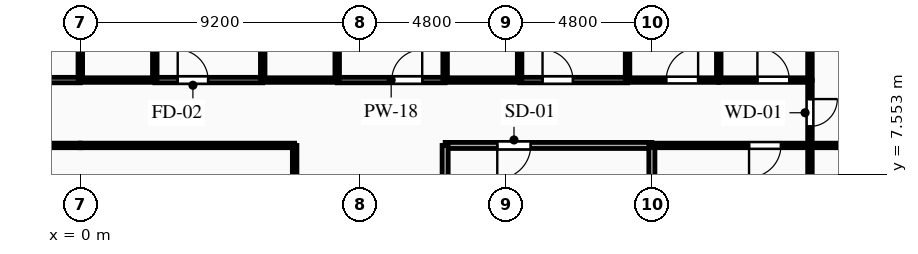
"""IFC4 building model, lengths in metres.
Left out: names, types, materials, properties, quantities, classifications, styles, units other than length and angle.
Written with IfcOpenShell. Run it as: python <this file> out.ifc"""

import sys

from ifc_helpers import new_model, si_unit, direction, frame, frame_2d, origin, place, context, subcontext, project, spatial, rectangle, extrude, element, fill, save


model = new_model("IFC4")
c1 = context("Model", 3, precision=1e-05, world=origin(), true_north=direction((0.0, 1.0)))
c2 = subcontext(c1, "Body", "Model", "MODEL_VIEW")
j1 = project(units=[si_unit("LENGTHUNIT", "METRE"), si_unit("PLANEANGLEUNIT", "RADIAN")], contexts=[c1])
p1 = place(None, origin())
s1 = spatial("IfcSite", under=j1, at=p1, CompositionType="ELEMENT")
p2 = place(p1, origin())
s2 = spatial("IfcBuilding", under=s1, at=p2, CompositionType="ELEMENT")
p3 = place(p2, frame((0.0, 0.0, 22.5)))
s3 = spatial("IfcBuildingStorey", under=s2, at=p3, CompositionType="ELEMENT", Elevation=22.5)
p4 = place(p3, frame((18.8, 8.5, 0.0), z_axis=(0.0, 0.0, 1.0), x_axis=(-1.0, 0.0, 0.0)))
e1 = element("IfcWall", 1, at=p4, inside=s3, PredefinedType="PARTITIONING", context=c2, shape_type="SweptSolid", body=[
    extrude(rectangle(XDim=6.8, YDim=0.2, at=frame_2d((3.4, 0.0))), origin(), (0.0, 0.0, 1.0), 4.16),
])
p5 = place(p4, frame((3.985, 0.0, 0.0)))
e2 = element("IfcOpeningElement", 2, at=p5, cuts=e1, PredefinedType="OPENING", context=c2, shape_type="SweptSolid", body=[
    extrude(rectangle(XDim=1.1, YDim=2.15, at=frame_2d((0.55, 1.075))), frame((0.0, 0.11, 0.0), z_axis=(0.0, -1.0, 0.0), x_axis=(1.0, 0.0, 0.0)), (0.0, 0.0, 1.0), 0.22),
])
p6 = place(p3, frame((12.0, 8.5, 0.0), z_axis=(0.0, 0.0, 1.0), x_axis=(0.0, -1.0, 0.0)))
e3 = element("IfcWall", 3, at=p6, inside=s3, PredefinedType="PARTITIONING", context=c2, shape_type="SweptSolid", body=[
    extrude(rectangle(XDim=2.9, YDim=0.2, at=frame_2d((1.45, 0.0))), origin(), (0.0, 0.0, 1.0), 4.16),
])
p7 = place(p3, frame((18.8, 5.6, 0.0), z_axis=(0.0, 0.0, 1.0), x_axis=(0.0, 1.0, 0.0)))
e4 = element("IfcWall", 4, at=p7, inside=s3, PredefinedType="PARTITIONING", context=c2, shape_type="SweptSolid", body=[
    extrude(rectangle(XDim=2.9, YDim=0.2, at=frame_2d((1.45, 0.0))), origin(), (0.0, 0.0, 1.0), 3.645),
])
p8 = place(p3, frame((-3.55, 10.65, 0.0), z_axis=(0.0, 0.0, 1.0), x_axis=(1.0, 0.0, 0.0)))
e5 = element("IfcWall", 5, at=p8, inside=s3, PredefinedType="PARTITIONING", context=c2, shape_type="SweptSolid", body=[
    extrude(rectangle(XDim=3.55, YDim=0.18, at=frame_2d((1.775, 0.0))), origin(), (0.0, 0.0, 1.0), 4.16),
])
p9 = place(p8, frame((1.275, 0.0, 0.0)))
e6 = element("IfcOpeningElement", 6, at=p9, cuts=e5, PredefinedType="OPENING", context=c2, shape_type="SweptSolid", body=[
    extrude(rectangle(XDim=1.0, YDim=2.15, at=frame_2d((0.5, 1.075))), frame((0.0, 0.1, 0.0), z_axis=(0.0, -1.0, 0.0), x_axis=(1.0, 0.0, 0.0)), (0.0, 0.0, 1.0), 0.2),
])
p10 = place(p3, frame((0.0, 8.5, 0.0), z_axis=(0.0, 0.0, 1.0), x_axis=(-1.0, 0.0, 0.0)))
e7 = element("IfcWall", 7, at=p10, inside=s3, PredefinedType="PARTITIONING", context=c2, shape_type="SweptSolid", body=[
    extrude(rectangle(XDim=7.05, YDim=0.15, at=frame_2d((3.525, 0.0))), origin(), (0.0, 0.0, 1.0), 4.16),
])
p11 = place(p3, frame((24.0, 10.65, 0.0), z_axis=(0.0, 0.0, 1.0), x_axis=(0.0, -1.0, 0.0)))
e8 = element("IfcWall", 8, at=p11, inside=s3, PredefinedType="PARTITIONING", context=c2, shape_type="SweptSolid", body=[
    extrude(rectangle(XDim=2.15, YDim=0.15, at=frame_2d((1.075, 0.0))), origin(), (0.0, 0.0, 1.0), 4.16),
])
p12 = place(p11, frame((0.625, 0.0, 0.0)))
e9 = element("IfcOpeningElement", 9, at=p12, cuts=e8, PredefinedType="OPENING", context=c2, shape_type="SweptSolid", body=[
    extrude(rectangle(XDim=0.9, YDim=2.1, at=frame_2d((0.45, 1.05))), frame((0.0, 0.085, 0.0), z_axis=(0.0, -1.0, 0.0), x_axis=(1.0, 0.0, 0.0)), (0.0, 0.0, 1.0), 0.17),
])
p13 = place(p3, frame((24.0, 8.5, 0.0), z_axis=(0.0, 0.0, 1.0), x_axis=(-1.0, 0.0, 0.0)))
e10 = element("IfcWall", 10, at=p13, inside=s3, PredefinedType="PARTITIONING", context=c2, shape_type="SweptSolid", body=[
    extrude(rectangle(XDim=5.2, YDim=0.15, at=frame_2d((2.6, 0.0))), origin(), (0.0, 0.0, 1.0), 4.16),
])
p14 = place(p13, frame((0.954, 0.0, 0.0)))
e11 = element("IfcOpeningElement", 11, at=p14, cuts=e10, PredefinedType="OPENING", context=c2, shape_type="SweptSolid", body=[
    extrude(rectangle(XDim=1.05, YDim=2.15, at=frame_2d((0.525, 1.075))), frame((0.0, 0.085, 0.0), z_axis=(0.0, -1.0, 0.0), x_axis=(1.0, 0.0, 0.0)), (0.0, 0.0, 1.0), 0.17),
])
p15 = place(p3, frame((2.45, 10.65, 0.0), z_axis=(0.0, 0.0, 1.0), x_axis=(1.0, 0.0, 0.0)))
e12 = element("IfcWall", 12, at=p15, inside=s3, PredefinedType="PARTITIONING", context=c2, shape_type="SweptSolid", body=[
    extrude(rectangle(XDim=3.55, YDim=0.18, at=frame_2d((1.775, 0.0))), origin(), (0.0, 0.0, 1.0), 4.16),
])
p16 = place(p15, frame((0.754, 0.0, 0.0)))
e13 = element("IfcOpeningElement", 13, at=p16, cuts=e12, PredefinedType="OPENING", context=c2, shape_type="SweptSolid", body=[
    extrude(rectangle(XDim=1.0, YDim=2.15, at=frame_2d((0.5, 1.075))), frame((0.0, 0.1, 0.0), z_axis=(0.0, -1.0, 0.0), x_axis=(1.0, 0.0, 0.0)), (0.0, 0.0, 1.0), 0.2),
])
p17 = place(p3, frame((0.0, 10.65, 0.0), z_axis=(0.0, 0.0, 1.0), x_axis=(1.0, 0.0, 0.0)))
e14 = element("IfcWall", 14, at=p17, inside=s3, PredefinedType="PLUMBINGWALL", context=c2, shape_type="SweptSolid", body=[
    extrude(rectangle(XDim=2.45, YDim=0.15, at=frame_2d((1.225, 0.0))), origin(), (0.0, 0.0, 1.0), 4.16),
])
p18 = place(p3, frame((8.45, 10.65, 0.0), z_axis=(0.0, 0.0, 1.0), x_axis=(1.0, 0.0, 0.0)))
e15 = element("IfcWall", 15, at=p18, inside=s3, PredefinedType="PARTITIONING", context=c2, shape_type="SweptSolid", body=[
    extrude(rectangle(XDim=3.55, YDim=0.18, at=frame_2d((1.775, 0.0))), origin(), (0.0, 0.0, 1.0), 4.16),
])
p19 = place(p18, frame((1.796, 0.0, 0.0)))
e16 = element("IfcOpeningElement", 16, at=p19, cuts=e15, PredefinedType="OPENING", context=c2, shape_type="SweptSolid", body=[
    extrude(rectangle(XDim=1.0, YDim=2.15, at=frame_2d((0.5, 1.075))), frame((0.0, 0.1, 0.0), z_axis=(0.0, -1.0, 0.0), x_axis=(1.0, 0.0, 0.0)), (0.0, 0.0, 1.0), 0.2),
])
p20 = place(p3, frame((6.0, 10.65, 0.0), z_axis=(0.0, 0.0, 1.0), x_axis=(1.0, 0.0, 0.0)))
e17 = element("IfcWall", 17, at=p20, inside=s3, PredefinedType="PLUMBINGWALL", context=c2, shape_type="SweptSolid", body=[
    extrude(rectangle(XDim=2.45, YDim=0.15, at=frame_2d((1.225, 0.0))), origin(), (0.0, 0.0, 1.0), 4.16),
])
p21 = place(p3, frame((14.45, 10.65, 0.0), z_axis=(0.0, 0.0, 1.0), x_axis=(1.0, 0.0, 0.0)))
e18 = element("IfcWall", 18, at=p21, inside=s3, PredefinedType="PARTITIONING", context=c2, shape_type="SweptSolid", body=[
    extrude(rectangle(XDim=3.55, YDim=0.18, at=frame_2d((1.775, 0.0))), origin(), (0.0, 0.0, 1.0), 4.16),
])
p22 = place(p21, frame((0.754, 0.0, 0.0)))
e19 = element("IfcOpeningElement", 19, at=p22, cuts=e18, PredefinedType="OPENING", context=c2, shape_type="SweptSolid", body=[
    extrude(rectangle(XDim=1.0, YDim=2.15, at=frame_2d((0.5, 1.075))), frame((0.0, 0.1, 0.0), z_axis=(0.0, -1.0, 0.0), x_axis=(1.0, 0.0, 0.0)), (0.0, 0.0, 1.0), 0.2),
])
p23 = place(p3, frame((12.0, 10.65, 0.0), z_axis=(0.0, 0.0, 1.0), x_axis=(1.0, 0.0, 0.0)))
e20 = element("IfcWall", 20, at=p23, inside=s3, PredefinedType="PLUMBINGWALL", context=c2, shape_type="SweptSolid", body=[
    extrude(rectangle(XDim=2.45, YDim=0.15, at=frame_2d((1.225, 0.0))), origin(), (0.0, 0.0, 1.0), 4.16),
])
p24 = place(p3, frame((18.0, 10.65, 0.0), z_axis=(0.0, 0.0, 1.0), x_axis=(1.0, 0.0, 0.0)))
e21 = element("IfcWall", 21, at=p24, inside=s3, PredefinedType="PARTITIONING", context=c2, shape_type="SweptSolid", body=[
    extrude(rectangle(XDim=3.0, YDim=0.15, at=frame_2d((1.5, 0.0))), origin(), (0.0, 0.0, 1.0), 4.16),
])
p25 = place(p24, frame((1.271, 0.0, 0.0)))
e22 = element("IfcOpeningElement", 22, at=p25, cuts=e21, PredefinedType="OPENING", context=c2, shape_type="SweptSolid", body=[
    extrude(rectangle(XDim=1.05, YDim=2.15, at=frame_2d((0.525, 1.075))), frame((0.0, 0.085, 0.0), z_axis=(0.0, -1.0, 0.0), x_axis=(1.0, 0.0, 0.0)), (0.0, 0.0, 1.0), 0.17),
])
p26 = place(p3, frame((21.0, 10.65, 0.0), z_axis=(0.0, 0.0, 1.0), x_axis=(1.0, 0.0, 0.0)))
e23 = element("IfcWall", 23, at=p26, inside=s3, PredefinedType="PARTITIONING", context=c2, shape_type="SweptSolid", body=[
    extrude(rectangle(XDim=3.0, YDim=0.15, at=frame_2d((1.5, 0.0))), origin(), (0.0, 0.0, 1.0), 4.16),
])
p27 = place(p26, frame((1.271, 0.0, 0.0)))
e24 = element("IfcOpeningElement", 24, at=p27, cuts=e23, PredefinedType="OPENING", context=c2, shape_type="SweptSolid", body=[
    extrude(rectangle(XDim=1.05, YDim=2.15, at=frame_2d((0.525, 1.075))), frame((0.0, 0.085, 0.0), z_axis=(0.0, -1.0, 0.0), x_axis=(1.0, 0.0, 0.0)), (0.0, 0.0, 1.0), 0.17),
])
p28 = place(p3, frame((7.05, 8.5, 0.0), z_axis=(0.0, 0.0, 1.0), x_axis=(-1.0, 0.0, 0.0)))
e25 = element("IfcWall", 25, at=p28, inside=s3, PredefinedType="PARTITIONING", context=c2, shape_type="SweptSolid", body=[
    extrude(rectangle(XDim=7.05, YDim=0.15, at=frame_2d((3.525, 0.0))), origin(), (0.0, 0.0, 1.0), 4.16),
])
p29 = place(p3, frame((7.05, -5.6, 0.0), z_axis=(0.0, 0.0, 1.0), x_axis=(0.0, 1.0, 0.0)))
e26 = element("IfcWall", 26, at=p29, inside=s3, PredefinedType="PARTITIONING", context=c2, shape_type="SweptSolid", body=[
    extrude(rectangle(XDim=14.1, YDim=0.15, at=frame_2d((7.05, 0.0))), origin(), (0.0, 0.0, 1.0), 4.16),
])
p30 = place(p3, frame((24.0, 8.5, 0.0), z_axis=(0.0, 0.0, 1.0), x_axis=(1.0, 0.0, 0.0)))
e27 = element("IfcWall", 27, at=p30, inside=s3, PredefinedType="PARTITIONING", context=c2, shape_type="SweptSolid", body=[
    extrude(rectangle(XDim=2.65, YDim=0.15, at=frame_2d((1.325, 0.0))), origin(), (0.0, 0.0, 1.0), 4.16),
])
p31 = place(p30, frame((0.965, 0.0, 0.0)))
e28 = element("IfcOpeningElement", 28, at=p31, cuts=e27, PredefinedType="OPENING", context=c2, shape_type="SweptSolid", body=[
    extrude(rectangle(XDim=1.05, YDim=2.15, at=frame_2d((0.525, 1.075))), frame((0.0, 0.085, 0.0), z_axis=(0.0, -1.0, 0.0), x_axis=(1.0, 0.0, 0.0)), (0.0, 0.0, 1.0), 0.17),
])
p32 = place(p3, frame((24.0, -5.6, 0.0), z_axis=(0.0, 0.0, 1.0), x_axis=(0.0, 1.0, 0.0)))
e29 = element("IfcWall", 29, at=p32, inside=s3, PredefinedType="PARTITIONING", context=c2, shape_type="SweptSolid", body=[
    extrude(rectangle(XDim=14.1, YDim=0.15, at=frame_2d((7.05, 0.0))), origin(), (0.0, 0.0, 1.0), 4.16),
])
p33 = place(p3, frame((24.0, 10.65, 0.0), z_axis=(0.0, 0.0, 1.0), x_axis=(0.0, 1.0, 0.0)))
e30 = element("IfcWall", 30, at=p33, inside=s3, PredefinedType="PARTITIONING", context=c2, shape_type="SweptSolid", body=[
    extrude(rectangle(XDim=14.15, YDim=0.15, at=frame_2d((7.075, 0.0))), origin(), (0.0, 0.0, 1.0), 4.16),
])
for number, where, z_axis, x_axis in (
    (31, (0.0, 12.8, 0.0), (0.0, 0.0, 1.0), (0.0, -1.0, 0.0)),
    (32, (2.45, 10.65, 0.0), (0.0, 0.0, 1.0), (0.0, 1.0, 0.0)),
    (33, (6.0, 12.8, 0.0), (0.0, 0.0, 1.0), (0.0, -1.0, 0.0)),
    (34, (8.45, 10.65, 0.0), (0.0, 0.0, 1.0), (0.0, 1.0, 0.0)),
    (35, (12.0, 12.8, 0.0), (0.0, 0.0, 1.0), (0.0, -1.0, 0.0)),
    (36, (14.45, 10.65, 0.0), (0.0, 0.0, 1.0), (0.0, 1.0, 0.0)),
):
    element("IfcWall", number, at=place(p3, frame(where, z_axis=z_axis, x_axis=x_axis)), inside=s3, PredefinedType="PLUMBINGWALL", context=c2, shape_type="SweptSolid", body=[
        extrude(rectangle(XDim=2.15, YDim=0.15, at=frame_2d((1.075, 0.0))), origin(), (0.0, 0.0, 1.0), 4.16),
    ])
for number, where, z_axis, x_axis in (
    (37, (18.0, 24.8, 0.0), (0.0, 0.0, 1.0), (0.0, -1.0, 0.0)),
    (38, (21.0, 24.8, 0.0), (0.0, 0.0, 1.0), (0.0, -1.0, 0.0)),
):
    element("IfcWall", number, at=place(p3, frame(where, z_axis=z_axis, x_axis=x_axis)), inside=s3, PredefinedType="PARTITIONING", context=c2, shape_type="SweptSolid", body=[
        extrude(rectangle(XDim=14.15, YDim=0.15, at=frame_2d((7.075, 0.0))), origin(), (0.0, 0.0, 1.0), 4.16),
    ])
p34 = place(p5, origin())
e39 = element("IfcDoor", 39, at=p34, inside=s3, OperationType="SINGLE_SWING_RIGHT", PredefinedType="DOOR", context=c2, shape_type="SweptSolid", body=[
    extrude(rectangle(XDim=1.1, YDim=2.15, at=frame_2d((0.55, 1.075))), frame((0.0, 0.025, 0.0), z_axis=(0.0, -1.0, 0.0), x_axis=(1.0, 0.0, 0.0)), (0.0, 0.0, 1.0), 0.05),
])
fill(e2, e39)
p35 = place(p12, origin())
e40 = element("IfcDoor", 40, at=p35, inside=s3, OperationType="SINGLE_SWING_LEFT", PredefinedType="DOOR", context=c2, shape_type="SweptSolid", body=[
    extrude(rectangle(XDim=0.9, YDim=2.1, at=frame_2d((0.45, 1.05))), frame((0.0, 0.025, 0.0), z_axis=(0.0, -1.0, 0.0), x_axis=(1.0, 0.0, 0.0)), (0.0, 0.0, 1.0), 0.05),
])
fill(e9, e40)
p36 = place(p14, origin())
e41 = element("IfcDoor", 41, at=p36, inside=s3, OperationType="SINGLE_SWING_RIGHT", PredefinedType="DOOR", context=c2, shape_type="SweptSolid", body=[
    extrude(rectangle(XDim=1.05, YDim=2.15, at=frame_2d((0.525, 1.075))), frame((0.0, 0.025, 0.0), z_axis=(0.0, -1.0, 0.0), x_axis=(1.0, 0.0, 0.0)), (0.0, 0.0, 1.0), 0.05),
])
fill(e11, e41)
p37 = place(p16, origin())
e42 = element("IfcDoor", 42, at=p37, inside=s3, OperationType="SINGLE_SWING_LEFT", PredefinedType="DOOR", context=c2, shape_type="SweptSolid", body=[
    extrude(rectangle(XDim=1.0, YDim=2.15, at=frame_2d((0.5, 1.075))), frame((0.0, 0.025, 0.0), z_axis=(0.0, -1.0, 0.0), x_axis=(1.0, 0.0, 0.0)), (0.0, 0.0, 1.0), 0.05),
])
fill(e13, e42)
p38 = place(p19, origin())
e43 = element("IfcDoor", 43, at=p38, inside=s3, OperationType="SINGLE_SWING_RIGHT", PredefinedType="DOOR", context=c2, shape_type="SweptSolid", body=[
    extrude(rectangle(XDim=1.0, YDim=2.15, at=frame_2d((0.5, 1.075))), frame((0.0, 0.025, 0.0), z_axis=(0.0, -1.0, 0.0), x_axis=(1.0, 0.0, 0.0)), (0.0, 0.0, 1.0), 0.05),
])
fill(e16, e43)
p39 = place(p22, origin())
e44 = element("IfcDoor", 44, at=p39, inside=s3, OperationType="SINGLE_SWING_LEFT", PredefinedType="DOOR", context=c2, shape_type="SweptSolid", body=[
    extrude(rectangle(XDim=1.0, YDim=2.15, at=frame_2d((0.5, 1.075))), frame((0.0, 0.025, 0.0), z_axis=(0.0, -1.0, 0.0), x_axis=(1.0, 0.0, 0.0)), (0.0, 0.0, 1.0), 0.05),
])
fill(e19, e44)
p40 = place(p25, origin())
e45 = element("IfcDoor", 45, at=p40, inside=s3, OperationType="SINGLE_SWING_RIGHT", PredefinedType="DOOR", context=c2, shape_type="SweptSolid", body=[
    extrude(rectangle(XDim=1.05, YDim=2.15, at=frame_2d((0.525, 1.075))), frame((0.0, 0.025, 0.0), z_axis=(0.0, -1.0, 0.0), x_axis=(1.0, 0.0, 0.0)), (0.0, 0.0, 1.0), 0.05),
])
fill(e22, e45)
p41 = place(p27, origin())
e46 = element("IfcDoor", 46, at=p41, inside=s3, OperationType="SINGLE_SWING_LEFT", PredefinedType="DOOR", context=c2, shape_type="SweptSolid", body=[
    extrude(rectangle(XDim=1.05, YDim=2.15, at=frame_2d((0.525, 1.075))), frame((0.0, 0.025, 0.0), z_axis=(0.0, -1.0, 0.0), x_axis=(1.0, 0.0, 0.0)), (0.0, 0.0, 1.0), 0.05),
])
fill(e24, e46)
save(model, sys.argv[1])
